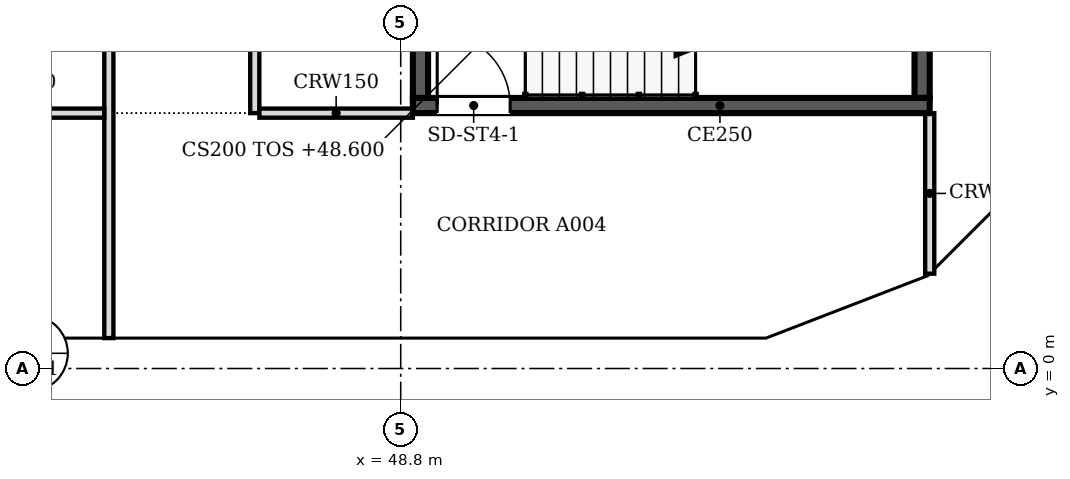
"""IFC4 building model, lengths in metres.
Left out: names, types, materials, properties, quantities, classifications, styles, units other than length and angle.
Written with IfcOpenShell. Run it as: python <this file> out.ifc"""

import sys

from ifc_helpers import new_model, si_unit, direction, frame, frame_2d, origin, place, context, subcontext, project, spatial, polyline, rectangle, outline, extrude, faceted_brep, source, transform, mapped, element, fill, save


model = new_model("IFC4")
c1 = context("Model", 3, precision=1e-05, world=origin(), true_north=direction((0.0, 1.0)))
c2 = subcontext(c1, "Body", "Model", "MODEL_VIEW")
j1 = project(units=[si_unit("LENGTHUNIT", "METRE"), si_unit("PLANEANGLEUNIT", "RADIAN")], contexts=[c1])
p1 = place(None, origin())
s1 = spatial("IfcSite", under=j1, at=p1, CompositionType="ELEMENT")
p2 = place(p1, origin())
s2 = spatial("IfcBuilding", under=s1, at=p2, CompositionType="ELEMENT")
p3 = place(p2, frame((0.0, 0.0, 48.6)))
s3 = spatial("IfcBuildingStorey", under=s2, at=p3, CompositionType="ELEMENT", Elevation=48.6)
m1 = source(origin(), c2, "Body", "SweptSolid", [
    extrude(outline(polyline([(3.05, 0.0), (6.1, 3.8), (3.05, 7.6), (0.0, 3.8), (3.05, 0.0)])), frame((0.0, 0.25, 0.0), z_axis=(0.0, -1.0, 0.0), x_axis=(1.0, 0.0, 0.0)), (0.0, 0.0, 1.0), 0.5),
])
p4 = place(p3, frame((39.65, 0.25, -3.8), z_axis=(0.0, 0.0, 1.0), x_axis=(1.0, 0.0, 0.0)))
e1 = element("IfcWall", 1, at=p4, inside=s3, PredefinedType="SOLIDWALL", context=c2, shape_type="MappedRepresentation", body=[
    mapped(m1, transform((0.0, 0.0, 0.0), scale=1.0)),
])
m2 = source(origin(), c2, "Body", "SweptSolid", [
    extrude(outline(polyline([(3.05, 0.399), (5.78, 3.8), (3.05, 7.2), (0.321, 3.8), (3.05, 0.399)])), frame((0.0, 0.26, 0.0), z_axis=(0.0, -1.0, 0.0), x_axis=(1.0, 0.0, 0.0)), (0.0, 0.0, 1.0), 0.52),
])
p5 = place(p4, origin())
e2 = element("IfcOpeningElement", 2, at=p5, cuts=e1, PredefinedType="OPENING", context=c2, shape_type="MappedRepresentation", body=[
    mapped(m2, transform((0.0, 0.0, 0.0), scale=1.0)),
])
p6 = place(p3, frame((45.75, 0.25, -3.8), z_axis=(0.0, 0.0, 1.0), x_axis=(1.0, 0.0, 0.0)))
e3 = element("IfcWall", 3, at=p6, inside=s3, PredefinedType="SOLIDWALL", context=c2, shape_type="MappedRepresentation", body=[
    mapped(m1, transform((0.0, 0.0, 0.0), scale=1.0)),
])
p7 = place(p6, origin())
e4 = element("IfcOpeningElement", 4, at=p7, cuts=e3, PredefinedType="OPENING", context=c2, shape_type="MappedRepresentation", body=[
    mapped(m2, transform((0.0, 0.0, 0.0), scale=1.0)),
])
m3 = source(origin(), c2, "Body", "Brep", [
    faceted_brep([(3.003, -0.25, 0.0), (3.05, -0.25, 0.06), (3.05, -0.25, 7.54), (3.003, -0.25, 7.6), (0.0, -0.25, 3.8), (0.0, 0.25, 3.8), (2.957, 0.25, 7.541), (2.957, 0.25, 0.059), (3.003, 0.0, 0.0), (3.003, 0.0, 7.6)], [[[0, 1, 2, 3, 4]], [[5, 6, 7]], [[1, 0, 8]], [[9, 3, 2]], [[6, 5, 4, 3, 9]], [[5, 7, 8, 0, 4]], [[1, 8, 7, 6, 9, 2]]]),
])
p8 = place(p3, frame((51.85, 0.25, -3.8), z_axis=(0.0, 0.0, 1.0), x_axis=(1.0, 0.0, 0.0)))
e5 = element("IfcWall", 5, at=p8, inside=s3, PredefinedType="SOLIDWALL", context=c2, shape_type="MappedRepresentation", body=[
    mapped(m3, transform((0.0, 0.0, 0.0), scale=1.0)),
])
m4 = source(origin(), c2, "Body", "SweptSolid", [
    extrude(outline(polyline([(2.803, 6.944), (0.319, 3.8), (2.803, 0.656), (2.803, 6.944)])), frame((0.0, 0.26, 0.0), z_axis=(0.0, -1.0, 0.0), x_axis=(1.0, 0.0, 0.0)), (0.0, 0.0, 1.0), 0.52),
])
p9 = place(p8, origin())
e6 = element("IfcOpeningElement", 6, at=p9, cuts=e5, PredefinedType="OPENING", context=c2, shape_type="MappedRepresentation", body=[
    mapped(m4, transform((0.0, 0.0, 0.0), scale=1.0)),
])
m5 = source(origin(), c2, "Body", "Brep", [
    faceted_brep([(0.047, -0.25, 0.0), (2.997, -0.25, 3.8), (0.047, -0.25, 7.6), (0.0, -0.25, 7.541), (0.0, -0.25, 0.059), (0.093, 0.25, 7.54), (2.944, 0.25, 3.868), (2.944, 0.25, 3.732), (0.093, 0.25, 0.06), (2.997, 0.0, 3.8), (0.047, 0.0, 0.0), (0.047, 0.0, 7.6)], [[[0, 1, 2, 3, 4]], [[5, 6, 7, 8]], [[8, 7, 9, 1, 0, 10]], [[6, 5, 11, 2, 1, 9]], [[3, 2, 11]], [[10, 0, 4]], [[8, 10, 4, 3, 11, 5]], [[7, 6, 9]]]),
])
p10 = place(p3, frame((54.81, 0.233, -3.8), z_axis=(0.0, 0.0, 1.0), x_axis=(0.932990326376, 0.359901446078, 0.0)))
e7 = element("IfcWall", 7, at=p10, inside=s3, PredefinedType="SOLIDWALL", context=c2, shape_type="MappedRepresentation", body=[
    mapped(m5, transform((0.0, 0.0, 0.0), scale=1.0)),
])
m6 = source(origin(), c2, "Body", "SweptSolid", [
    extrude(outline(polyline([(0.247, 0.665), (2.681, 3.8), (0.247, 6.935), (0.247, 0.665)])), frame((0.0, 0.26, 0.0), z_axis=(0.0, -1.0, 0.0), x_axis=(1.0, 0.0, 0.0)), (0.0, 0.0, 1.0), 0.52),
])
p11 = place(p10, origin())
e8 = element("IfcOpeningElement", 8, at=p11, cuts=e7, PredefinedType="OPENING", context=c2, shape_type="MappedRepresentation", body=[
    mapped(m6, transform((0.0, 0.0, 0.0), scale=1.0)),
])
m7 = source(origin(), c2, "Body", "Brep", [
    faceted_brep([(2.944, -0.25, 0.0), (2.997, -0.25, 0.068), (2.997, -0.25, 7.532), (2.944, -0.25, 7.6), (0.0, -0.25, 3.8), (0.053, 0.25, 3.868), (2.891, 0.25, 7.532), (2.891, 0.25, 0.068), (0.053, 0.25, 3.732), (2.944, 0.0, 0.0), (2.944, 0.0, 7.6), (0.0, 0.0, 3.8)], [[[0, 1, 2, 3, 4]], [[5, 6, 7, 8]], [[1, 0, 9]], [[10, 3, 2]], [[6, 5, 11, 4, 3, 10]], [[8, 7, 9, 0, 4, 11]], [[8, 11, 5]], [[1, 9, 7, 6, 10, 2]]]),
])
p12 = place(p3, frame((57.606, 1.312, -3.8), z_axis=(0.0, 0.0, 1.0), x_axis=(0.707147509625, 0.707066050402, 0.0)))
e9 = element("IfcWall", 9, at=p12, inside=s3, PredefinedType="SOLIDWALL", context=c2, shape_type="MappedRepresentation", body=[
    mapped(m7, transform((0.0, 0.0, 0.0), scale=1.0)),
])
m8 = source(origin(), c2, "Body", "SweptSolid", [
    extrude(outline(polyline([(2.744, 6.934), (0.316, 3.8), (2.744, 0.666), (2.744, 6.934)])), frame((0.0, 0.26, 0.0), z_axis=(0.0, -1.0, 0.0), x_axis=(1.0, 0.0, 0.0)), (0.0, 0.0, 1.0), 0.52),
])
p13 = place(p12, origin())
e10 = element("IfcOpeningElement", 10, at=p13, cuts=e9, PredefinedType="OPENING", context=c2, shape_type="MappedRepresentation", body=[
    mapped(m8, transform((0.0, 0.0, 0.0), scale=1.0)),
])
p14 = place(p2, frame((0.0, 0.0, 52.4)))
s4 = spatial("IfcBuildingStorey", under=s2, at=p14, CompositionType="ELEMENT", Elevation=52.4)
m9 = source(origin(), c2, "Body", "SweptSolid", [
    extrude(outline(polyline([(3.05, 0.0), (6.1, 3.8), (3.05, 7.6), (0.0, 3.8), (3.05, 0.0)])), frame((0.0, 0.25, 0.0), z_axis=(0.0, -1.0, 0.0), x_axis=(1.0, 0.0, 0.0)), (0.0, 0.0, 1.0), 0.5),
])
p15 = place(p14, frame((42.7, 0.25, -3.8), z_axis=(0.0, 0.0, 1.0), x_axis=(1.0, 0.0, 0.0)))
e11 = element("IfcWall", 11, at=p15, inside=s4, PredefinedType="SOLIDWALL", context=c2, shape_type="MappedRepresentation", body=[
    mapped(m9, transform((0.0, 0.0, 0.0), scale=1.0)),
])
m10 = source(origin(), c2, "Body", "SweptSolid", [
    extrude(outline(polyline([(3.05, 0.399), (5.78, 3.8), (3.05, 7.2), (0.321, 3.8), (3.05, 0.399)])), frame((0.0, 0.26, 0.0), z_axis=(0.0, -1.0, 0.0), x_axis=(1.0, 0.0, 0.0)), (0.0, 0.0, 1.0), 0.52),
])
p16 = place(p15, origin())
e12 = element("IfcOpeningElement", 12, at=p16, cuts=e11, PredefinedType="OPENING", context=c2, shape_type="MappedRepresentation", body=[
    mapped(m10, transform((0.0, 0.0, 0.0), scale=1.0)),
])
m11 = source(origin(), c2, "Body", "Brep", [
    faceted_brep([(3.05, -0.25, 0.0), (6.053, -0.25, 3.8), (3.05, -0.25, 7.6), (0.0, -0.25, 3.8), (0.0, 0.25, 3.8), (3.05, 0.25, 7.6), (6.007, 0.25, 3.859), (6.007, 0.25, 3.741), (3.05, 0.25, 0.0), (6.053, 0.0, 3.8)], [[[0, 1, 2, 3]], [[4, 5, 6, 7, 8]], [[8, 7, 9, 1, 0]], [[6, 5, 2, 1, 9]], [[5, 4, 3, 2]], [[4, 8, 0, 3]], [[9, 7, 6]]]),
])
p17 = place(p14, frame((48.8, 0.25, -3.8), z_axis=(0.0, 0.0, 1.0), x_axis=(1.0, 0.0, 0.0)))
e13 = element("IfcWall", 13, at=p17, inside=s4, PredefinedType="SOLIDWALL", context=c2, shape_type="MappedRepresentation", body=[
    mapped(m11, transform((0.0, 0.0, 0.0), scale=1.0)),
])
m12 = source(origin(), c2, "Body", "SweptSolid", [
    extrude(outline(polyline([(3.049, 0.401), (5.735, 3.8), (3.049, 7.199), (0.321, 3.8), (3.049, 0.401)])), frame((0.0, 0.26, 0.0), z_axis=(0.0, -1.0, 0.0), x_axis=(1.0, 0.0, 0.0)), (0.0, 0.0, 1.0), 0.52),
])
p18 = place(p17, origin())
e14 = element("IfcOpeningElement", 14, at=p18, cuts=e13, PredefinedType="OPENING", context=c2, shape_type="MappedRepresentation", body=[
    mapped(m12, transform((0.0, 0.0, 0.0), scale=1.0)),
])
m13 = source(origin(), c2, "Body", "Brep", [
    faceted_brep([(2.95, -0.25, 0.0), (3.003, -0.25, 0.068), (3.003, -0.25, 7.531), (2.95, -0.25, 7.6), (0.0, -0.25, 3.8), (0.047, 0.25, 3.86), (2.898, 0.25, 7.532), (2.898, 0.25, 0.068), (0.047, 0.25, 3.74), (2.95, 0.0, 0.0), (2.95, 0.0, 7.6), (0.0, 0.0, 3.8)], [[[0, 1, 2, 3, 4]], [[5, 6, 7, 8]], [[1, 0, 9]], [[10, 3, 2]], [[6, 5, 11, 4, 3, 10]], [[8, 7, 9, 0, 4, 11]], [[8, 11, 5]], [[1, 9, 7, 6, 10, 2]]]),
])
p19 = place(p14, frame((54.854, 0.25, -3.8), z_axis=(0.0, 0.0, 1.0), x_axis=(0.932970071518, 0.359953949349, 0.0)))
e15 = element("IfcWall", 15, at=p19, inside=s4, PredefinedType="SOLIDWALL", context=c2, shape_type="MappedRepresentation", body=[
    mapped(m13, transform((0.0, 0.0, 0.0), scale=1.0)),
])
m14 = source(origin(), c2, "Body", "SweptSolid", [
    extrude(outline(polyline([(2.75, 6.935), (0.316, 3.8), (2.75, 0.665), (2.75, 6.935)])), frame((0.0, 0.26, 0.0), z_axis=(0.0, -1.0, 0.0), x_axis=(1.0, 0.0, 0.0)), (0.0, 0.0, 1.0), 0.52),
])
p20 = place(p19, origin())
e16 = element("IfcOpeningElement", 16, at=p20, cuts=e15, PredefinedType="OPENING", context=c2, shape_type="MappedRepresentation", body=[
    mapped(m14, transform((0.0, 0.0, 0.0), scale=1.0)),
])
m15 = source(origin(), c2, "Body", "Brep", [
    faceted_brep([(0.053, -0.25, 0.0), (2.997, -0.25, 3.8), (0.053, -0.25, 7.6), (0.0, -0.25, 7.532), (0.0, -0.25, 0.068), (0.106, 0.25, 7.531), (2.944, 0.25, 3.868), (2.944, 0.25, 3.732), (0.106, 0.25, 0.068), (2.997, 0.0, 3.8), (0.053, 0.0, 0.0), (0.053, 0.0, 7.6)], [[[0, 1, 2, 3, 4]], [[5, 6, 7, 8]], [[8, 7, 9, 1, 0, 10]], [[6, 5, 11, 2, 1, 9]], [[3, 2, 11]], [[10, 0, 4]], [[8, 10, 4, 3, 11, 5]], [[9, 7, 6]]]),
])
p21 = place(p14, frame((57.569, 1.274, -3.8), z_axis=(0.0, 0.0, 1.0), x_axis=(0.707066050402, 0.707147509625, 0.0)))
e17 = element("IfcWall", 17, at=p21, inside=s4, PredefinedType="SOLIDWALL", context=c2, shape_type="MappedRepresentation", body=[
    mapped(m15, transform((0.0, 0.0, 0.0), scale=1.0)),
])
m16 = source(origin(), c2, "Body", "SweptSolid", [
    extrude(outline(polyline([(0.253, 0.666), (2.681, 3.8), (0.253, 6.934), (0.253, 0.666)])), frame((0.0, 0.26, 0.0), z_axis=(0.0, -1.0, 0.0), x_axis=(1.0, 0.0, 0.0)), (0.0, 0.0, 1.0), 0.52),
])
p22 = place(p21, origin())
e18 = element("IfcOpeningElement", 18, at=p22, cuts=e17, PredefinedType="OPENING", context=c2, shape_type="MappedRepresentation", body=[
    mapped(m16, transform((0.0, 0.0, 0.0), scale=1.0)),
])
p23 = place(p3, frame((57.5, 4.325, 0.0), z_axis=(0.0, 0.0, 1.0), x_axis=(-1.0, 0.0, 0.0)))
e19 = element("IfcWall", 19, at=p23, inside=s3, PredefinedType="SOLIDWALL", context=c2, shape_type="SweptSolid", body=[
    extrude(rectangle(XDim=8.5, YDim=0.25, at=frame_2d((4.25, 0.0))), origin(), (0.0, 0.0, 1.0), 3.8),
])
m17 = source(origin(), c2, "Body", "SweptSolid", [
    extrude(rectangle(XDim=1.2, YDim=2.1, at=frame_2d((0.6, 1.05))), frame((0.0, 0.135, 0.0), z_axis=(0.0, -1.0, 0.0), x_axis=(1.0, 0.0, 0.0)), (0.0, 0.0, 1.0), 0.27),
])
p24 = place(p23, frame((6.9, 0.0, 0.0)))
e20 = element("IfcOpeningElement", 20, at=p24, cuts=e19, PredefinedType="OPENING", context=c2, shape_type="MappedRepresentation", body=[
    mapped(m17, transform((0.0, 0.0, 0.0), scale=1.0)),
])
for number, where, z_axis, x_axis in (
    (21, (49.125, 4.45, 0.0), (0.0, 0.0, 1.0), (0.0, 1.0, 0.0)),
    (22, (57.375, 7.85, 0.0), (0.0, 0.0, 1.0), (0.0, -1.0, 0.0)),
):
    element("IfcWall", number, at=place(p3, frame(where, z_axis=z_axis, x_axis=x_axis)), inside=s3, PredefinedType="SOLIDWALL", context=c2, shape_type="SweptSolid", body=[
        extrude(rectangle(XDim=3.4, YDim=0.25, at=frame_2d((1.7, 0.0))), origin(), (0.0, 0.0, 1.0), 3.8),
    ])
p25 = place(p3, frame((44.0, 0.5, 0.0), z_axis=(0.0, 0.0, 1.0), x_axis=(0.0, 1.0, 0.0)))
e23 = element("IfcWall", 23, at=p25, inside=s3, PredefinedType="PARTITIONING", context=c2, shape_type="SweptSolid", body=[
    extrude(rectangle(XDim=21.424, YDim=0.15, at=frame_2d((10.712, 0.0))), origin(), (0.0, 0.0, 1.0), 3.067),
])
m18 = source(origin(), c2, "Body", "SweptSolid", [
    extrude(rectangle(XDim=1.0, YDim=2.1, at=frame_2d((0.5, 1.05))), frame((0.0, 0.085, 0.0), z_axis=(0.0, -1.0, 0.0), x_axis=(1.0, 0.0, 0.0)), (0.0, 0.0, 1.0), 0.17),
])
p26 = place(p25, frame((6.2, 0.0, 0.0)))
e24 = element("IfcOpeningElement", 24, at=p26, cuts=e23, PredefinedType="OPENING", context=c2, shape_type="MappedRepresentation", body=[
    mapped(m18, transform((0.0, 0.0, 0.0), scale=1.0)),
])
m19 = source(origin(), c2, "Body", "SweptSolid", [
    extrude(rectangle(XDim=0.9, YDim=2.1, at=frame_2d((0.45, 1.05))), frame((0.0, 0.085, 0.0), z_axis=(0.0, -1.0, 0.0), x_axis=(1.0, 0.0, 0.0)), (0.0, 0.0, 1.0), 0.17),
])
p27 = place(p25, frame((15.1, 0.0, 0.0)))
e25 = element("IfcOpeningElement", 25, at=p27, cuts=e23, PredefinedType="OPENING", context=c2, shape_type="MappedRepresentation", body=[
    mapped(m19, transform((0.0, 0.0, 0.0), scale=1.0)),
])
p28 = place(p3, frame((57.5, 1.559, 0.0), z_axis=(0.0, 0.0, 1.0), x_axis=(0.0, 1.0, 0.0)))
e26 = element("IfcWall", 26, at=p28, inside=s3, PredefinedType="PARTITIONING", context=c2, shape_type="SweptSolid", body=[
    extrude(rectangle(XDim=2.641, YDim=0.15, at=frame_2d((1.32, 0.0))), origin(), (0.0, 0.0, 1.0), 3.067),
])
p29 = place(p3, frame((40.951, 4.2, 0.0), z_axis=(0.0, 0.0, 1.0), x_axis=(1.0, 0.0, 0.0)))
e27 = element("IfcWall", 27, at=p29, inside=s3, PredefinedType="PARTITIONING", context=c2, shape_type="SweptSolid", body=[
    extrude(rectangle(XDim=2.973, YDim=0.15, at=frame_2d((1.487, 0.0))), origin(), (0.0, 0.0, 1.0), 3.067),
])
p30 = place(p3, frame((46.4, 21.924, 0.0), z_axis=(0.0, 0.0, 1.0), x_axis=(0.0, -1.0, 0.0)))
e28 = element("IfcWall", 28, at=p30, inside=s3, PredefinedType="PARTITIONING", context=c2, shape_type="SweptSolid", body=[
    extrude(rectangle(XDim=17.724, YDim=0.15, at=frame_2d((8.862, 0.0))), origin(), (0.0, 0.0, 1.0), 3.067),
])
p31 = place(p30, frame((1.923, 0.0, 0.0)))
e29 = element("IfcOpeningElement", 29, at=p31, cuts=e28, PredefinedType="OPENING", context=c2, shape_type="MappedRepresentation", body=[
    mapped(m18, transform((0.0, 0.0, 0.0), scale=1.0)),
])
p32 = place(p30, frame((10.824, 0.0, 0.0)))
e30 = element("IfcOpeningElement", 30, at=p32, cuts=e28, PredefinedType="OPENING", context=c2, shape_type="MappedRepresentation", body=[
    mapped(m18, transform((0.0, 0.0, 0.0), scale=1.0)),
])
p33 = place(p3, frame((46.476, 4.2, 0.0), z_axis=(0.0, 0.0, 1.0), x_axis=(1.0, 0.0, 0.0)))
e31 = element("IfcWall", 31, at=p33, inside=s3, PredefinedType="PARTITIONING", context=c2, shape_type="SweptSolid", body=[
    extrude(rectangle(XDim=2.524, YDim=0.15, at=frame_2d((1.262, 0.0))), origin(), (0.0, 0.0, 1.0), 3.067),
])
m20 = source(origin(), c2, "Body", "SweptSolid", [
    extrude(rectangle(XDim=1.2, YDim=2.1, at=frame_2d((0.6, 1.05))), frame((0.0, 0.025, 0.0), z_axis=(0.0, -1.0, 0.0), x_axis=(1.0, 0.0, 0.0)), (0.0, 0.0, 1.0), 0.05),
])
p34 = place(p24, origin())
e32 = element("IfcDoor", 32, at=p34, inside=s3, OperationType="SINGLE_SWING_RIGHT", PredefinedType="DOOR", context=c2, shape_type="MappedRepresentation", body=[
    mapped(m20, transform((0.0, 0.0, 0.0), scale=1.0)),
])
fill(e20, e32)
save(model, sys.argv[1])
